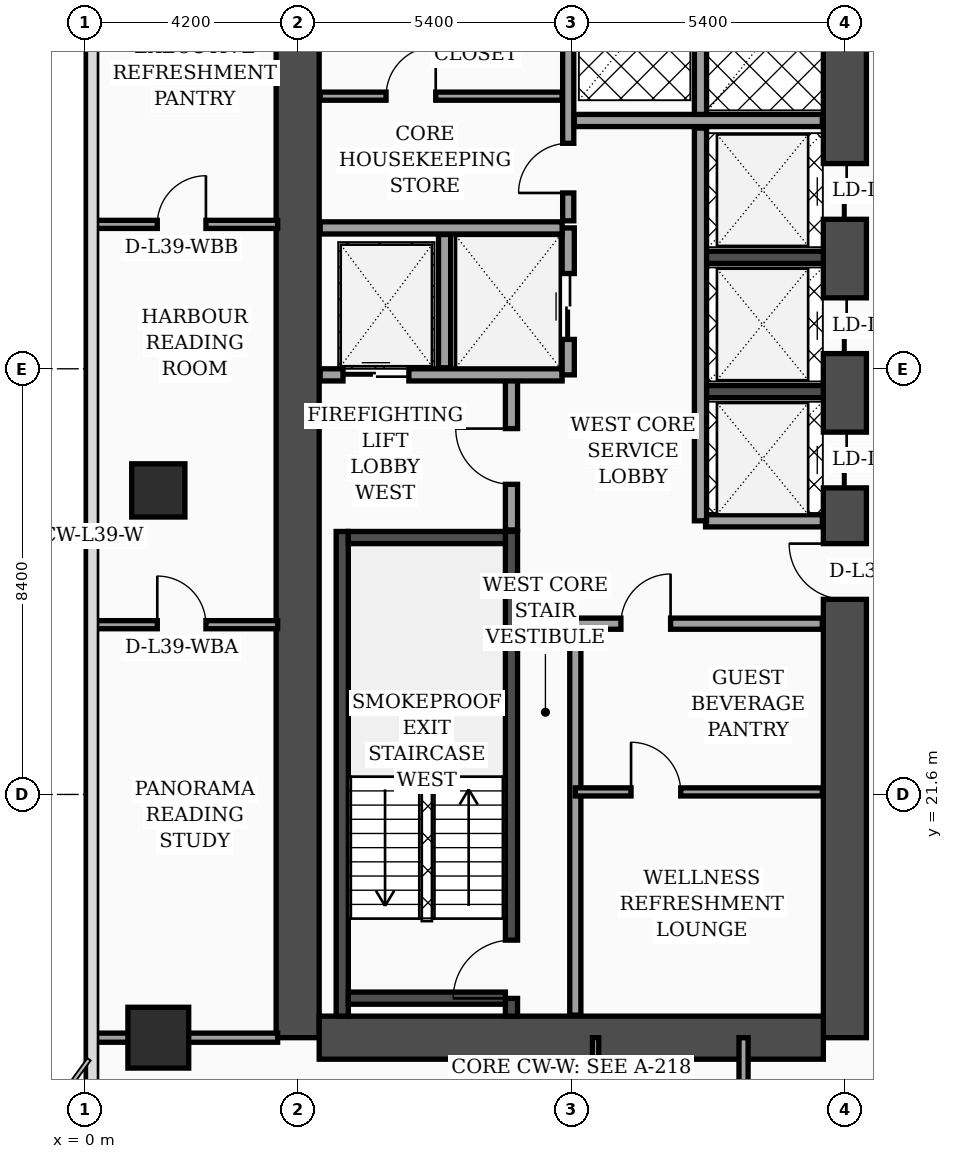
"""IFC4 building model, lengths in metres.
Left out: names, types, materials, properties, quantities, classifications, styles, units other than length and angle.
Written with IfcOpenShell. Run it as: python <this file> out.ifc"""

import sys

from ifc_helpers import new_model, si_unit, direction, frame, frame_2d, origin, origin_2d, place, context, subcontext, project, spatial, rectangle, extrude, element, fill, save


model = new_model("IFC4")
c1 = context("Model", 3, precision=1e-05, world=origin(), true_north=direction((0.0, 1.0)))
c2 = subcontext(c1, "Body", "Model", "MODEL_VIEW")
j1 = project(units=[si_unit("LENGTHUNIT", "METRE"), si_unit("PLANEANGLEUNIT", "RADIAN")], contexts=[c1])
p1 = place(None, origin())
s1 = spatial("IfcSite", under=j1, at=p1, CompositionType="ELEMENT")
p2 = place(p1, origin())
s2 = spatial("IfcBuilding", under=s1, at=p2, CompositionType="ELEMENT")
p3 = place(p2, frame((0.0, 0.0, 159.9)))
s3 = spatial("IfcBuildingStorey", under=s2, at=p3, CompositionType="ELEMENT", Elevation=159.9)
p4 = place(p3, frame((4.2, 16.8, 0.0), z_axis=(0.0, 0.0, 1.0), x_axis=(0.0, 1.0, 0.0)))
e1 = element("IfcWall", 1, at=p4, inside=s3, PredefinedType="SHEAR", context=c2, shape_type="SweptSolid", body=[
    extrude(rectangle(XDim=21.6, YDim=0.85, at=frame_2d((10.8, 0.0))), origin(), (0.0, 0.0, 1.0), 3.56),
])
p5 = place(p3, frame((15.0, 16.8, 0.0), z_axis=(0.0, 0.0, 1.0), x_axis=(0.0, 1.0, 0.0)))
e2 = element("IfcWall", 2, at=p5, inside=s3, PredefinedType="SHEAR", context=c2, shape_type="SweptSolid", body=[
    extrude(rectangle(XDim=21.6, YDim=0.85, at=frame_2d((10.8, 0.0))), origin(), (0.0, 0.0, 1.0), 3.56),
])
p6 = place(p5, frame((8.65, 0.0, 0.0)))
e3 = element("IfcOpeningElement", 3, at=p6, cuts=e2, PredefinedType="OPENING", context=c2, shape_type="SweptSolid", body=[
    extrude(rectangle(XDim=1.1, YDim=2.2, at=frame_2d((0.55, 1.1))), frame((0.0, 0.435, 0.0), z_axis=(0.0, -1.0, 0.0), x_axis=(1.0, 0.0, 0.0)), (0.0, 0.0, 1.0), 0.87),
])
p7 = place(p5, frame((10.85, 0.0, 0.0)))
e4 = element("IfcOpeningElement", 4, at=p7, cuts=e2, PredefinedType="OPENING", context=c2, shape_type="SweptSolid", body=[
    extrude(rectangle(XDim=1.1, YDim=2.2, at=frame_2d((0.55, 1.1))), frame((0.0, 0.435, 0.0), z_axis=(0.0, -1.0, 0.0), x_axis=(1.0, 0.0, 0.0)), (0.0, 0.0, 1.0), 0.87),
])
p8 = place(p5, frame((13.5, 0.0, 0.0)))
e5 = element("IfcOpeningElement", 5, at=p8, cuts=e2, PredefinedType="OPENING", context=c2, shape_type="SweptSolid", body=[
    extrude(rectangle(XDim=1.1, YDim=2.2, at=frame_2d((0.55, 1.1))), frame((0.0, 0.435, 0.0), z_axis=(0.0, -1.0, 0.0), x_axis=(1.0, 0.0, 0.0)), (0.0, 0.0, 1.0), 0.87),
])
p9 = place(p5, frame((16.15, 0.0, 0.0)))
e6 = element("IfcOpeningElement", 6, at=p9, cuts=e2, PredefinedType="OPENING", context=c2, shape_type="SweptSolid", body=[
    extrude(rectangle(XDim=1.1, YDim=2.2, at=frame_2d((0.55, 1.1))), frame((0.0, 0.435, 0.0), z_axis=(0.0, -1.0, 0.0), x_axis=(1.0, 0.0, 0.0)), (0.0, 0.0, 1.0), 0.87),
])
p10 = place(p3, frame((4.625, 16.8, 0.0), z_axis=(0.0, 0.0, 1.0), x_axis=(1.0, 0.0, 0.0)))
e7 = element("IfcWall", 7, at=p10, inside=s3, PredefinedType="SHEAR", context=c2, shape_type="SweptSolid", body=[
    extrude(rectangle(XDim=9.95, YDim=0.85, at=frame_2d((4.975, 0.0))), origin(), (0.0, 0.0, 1.0), 3.56),
])
p11 = place(p3, frame((5.08, 17.225, 0.0), z_axis=(0.0, 0.0, 1.0), x_axis=(0.0, 1.0, 0.0)))
e8 = element("IfcWall", 8, at=p11, inside=s3, PredefinedType="SOLIDWALL", context=c2, shape_type="SweptSolid", body=[
    extrude(rectangle(XDim=9.565, YDim=0.24, at=frame_2d((4.782, 0.0))), origin(), (0.0, 0.0, 1.0), 3.56),
])
p12 = place(p3, frame((8.42, 17.225, 0.0), z_axis=(0.0, 0.0, 1.0), x_axis=(0.0, 1.0, 0.0)))
e9 = element("IfcWall", 9, at=p12, inside=s3, PredefinedType="SOLIDWALL", context=c2, shape_type="SweptSolid", body=[
    extrude(rectangle(XDim=9.565, YDim=0.24, at=frame_2d((4.782, 0.0))), origin(), (0.0, 0.0, 1.0), 3.56),
])
p13 = place(p12, frame((0.35, 0.0, 0.0)))
e10 = element("IfcOpeningElement", 10, at=p13, cuts=e9, PredefinedType="OPENING", context=c2, shape_type="SweptSolid", body=[
    extrude(rectangle(XDim=1.15, YDim=2.2, at=frame_2d((0.575, 1.1))), frame((0.0, 0.13, 0.0), z_axis=(0.0, -1.0, 0.0), x_axis=(1.0, 0.0, 0.0)), (0.0, 0.0, 1.0), 0.26),
])
for number, where, z_axis, x_axis in (
    (11, (5.2, 17.58, 0.0), (0.0, 0.0, 1.0), (1.0, 0.0, 0.0)),
    (12, (5.2, 26.67, 0.0), (0.0, 0.0, 1.0), (1.0, 0.0, 0.0)),
):
    element("IfcWall", number, at=place(p3, frame(where, z_axis=z_axis, x_axis=x_axis)), inside=s3, PredefinedType="SOLIDWALL", context=c2, shape_type="SweptSolid", body=[
        extrude(rectangle(XDim=3.1, YDim=0.24, at=frame_2d((1.55, 0.0))), origin(), (0.0, 0.0, 1.0), 3.56),
    ])
for number, where, z_axis, x_axis in (
    (13, (12.18, 29.55, 0.0), (0.0, 0.0, 1.0), (1.0, 0.0, 0.0)),
    (14, (12.18, 32.2, 0.0), (0.0, 0.0, 1.0), (1.0, 0.0, 0.0)),
):
    element("IfcWall", number, at=place(p3, frame(where, z_axis=z_axis, x_axis=x_axis)), inside=s3, PredefinedType="SOLIDWALL", context=c2, shape_type="SweptSolid", body=[
        extrude(rectangle(XDim=2.395, YDim=0.24, at=frame_2d((1.198, 0.0))), origin(), (0.0, 0.0, 1.0), 3.56),
    ])
p14 = place(p3, frame((1.45, 16.8, 0.0), z_axis=(0.0, 0.0, 1.0), x_axis=(1.0, 0.0, 0.0)))
e15 = element("IfcColumn", 15, at=p14, inside=s3, PredefinedType="COLUMN", context=c2, shape_type="SweptSolid", body=[
    extrude(rectangle(XDim=1.2, YDim=1.2, at=origin_2d()), origin(), (0.0, 0.0, 1.0), 3.56),
])
p15 = place(p3, frame((1.45, 27.6, 0.0), z_axis=(0.0, 0.0, 1.0), x_axis=(1.0, 0.0, 0.0)))
e16 = element("IfcColumn", 16, at=p15, inside=s3, PredefinedType="COLUMN", context=c2, shape_type="SweptSolid", body=[
    extrude(rectangle(XDim=1.05, YDim=1.05, at=origin_2d()), origin(), (0.0, 0.0, 1.0), 3.56),
])
p16 = place(p3, frame((8.42, 26.82, 0.0), z_axis=(0.0, 0.0, 1.0), x_axis=(0.0, 1.0, 0.0)))
e17 = element("IfcWall", 17, at=p16, inside=s3, PredefinedType="SOLIDWALL", context=c2, shape_type="SweptSolid", body=[
    extrude(rectangle(XDim=3.0, YDim=0.24, at=frame_2d((1.5, 0.0))), origin(), (0.0, 0.0, 1.0), 3.56),
])
p17 = place(p16, frame((0.9, 0.0, 0.0)))
e18 = element("IfcOpeningElement", 18, at=p17, cuts=e17, PredefinedType="OPENING", context=c2, shape_type="SweptSolid", body=[
    extrude(rectangle(XDim=1.1, YDim=2.2, at=frame_2d((0.55, 1.1))), frame((0.0, 0.13, 0.0), z_axis=(0.0, -1.0, 0.0), x_axis=(1.0, 0.0, 0.0)), (0.0, 0.0, 1.0), 0.26),
])
p18 = place(p3, frame((4.645, 29.88, 0.0), z_axis=(0.0, 0.0, 1.0), x_axis=(1.0, 0.0, 0.0)))
e19 = element("IfcWall", 19, at=p18, inside=s3, PredefinedType="SOLIDWALL", context=c2, shape_type="SweptSolid", body=[
    extrude(rectangle(XDim=4.775, YDim=0.24, at=frame_2d((2.387, 0.0))), origin(), (0.0, 0.0, 1.0), 3.56),
])
p19 = place(p18, frame((0.45, 0.0, 0.0)))
e20 = element("IfcOpeningElement", 20, at=p19, cuts=e19, PredefinedType="OPENING", context=c2, shape_type="SweptSolid", body=[
    extrude(rectangle(XDim=1.3, YDim=2.35, at=frame_2d((0.65, 1.175))), frame((0.0, 0.13, 0.0), z_axis=(0.0, -1.0, 0.0), x_axis=(1.0, 0.0, 0.0)), (0.0, 0.0, 1.0), 0.26),
])
p20 = place(p3, frame((7.1, 30.02, 0.0), z_axis=(0.0, 0.0, 1.0), x_axis=(0.0, 1.0, 0.0)))
e21 = element("IfcWall", 21, at=p20, inside=s3, PredefinedType="SOLIDWALL", context=c2, shape_type="SweptSolid", body=[
    extrude(rectangle(XDim=2.63, YDim=0.24, at=frame_2d((1.315, 0.0))), origin(), (0.0, 0.0, 1.0), 3.56),
])
p21 = place(p3, frame((9.54, 29.88, 0.0), z_axis=(0.0, 0.0, 1.0), x_axis=(0.0, 1.0, 0.0)))
e22 = element("IfcWall", 22, at=p21, inside=s3, PredefinedType="SOLIDWALL", context=c2, shape_type="SweptSolid", body=[
    extrude(rectangle(XDim=2.9, YDim=0.24, at=frame_2d((1.45, 0.0))), origin(), (0.0, 0.0, 1.0), 3.56),
])
p22 = place(p21, frame((0.7, 0.0, 0.0)))
e23 = element("IfcOpeningElement", 23, at=p22, cuts=e22, PredefinedType="OPENING", context=c2, shape_type="SweptSolid", body=[
    extrude(rectangle(XDim=1.3, YDim=2.35, at=frame_2d((0.65, 1.175))), frame((0.0, 0.13, 0.0), z_axis=(0.0, -1.0, 0.0), x_axis=(1.0, 0.0, 0.0)), (0.0, 0.0, 1.0), 0.26),
])
p23 = place(p3, frame((4.645, 32.78, 0.0), z_axis=(0.0, 0.0, 1.0), x_axis=(1.0, 0.0, 0.0)))
e24 = element("IfcWall", 24, at=p23, inside=s3, PredefinedType="SOLIDWALL", context=c2, shape_type="SweptSolid", body=[
    extrude(rectangle(XDim=4.775, YDim=0.24, at=frame_2d((2.387, 0.0))), origin(), (0.0, 0.0, 1.0), 3.19),
])
p24 = place(p3, frame((9.68, 17.245, 0.0), z_axis=(0.0, 0.0, 1.0), x_axis=(0.0, 1.0, 0.0)))
e25 = element("IfcWall", 25, at=p24, inside=s3, PredefinedType="SOLIDWALL", context=c2, shape_type="SweptSolid", body=[
    extrude(rectangle(XDim=7.755, YDim=0.22, at=frame_2d((3.877, 0.0))), origin(), (0.0, 0.0, 1.0), 3.56),
])
p25 = place(p3, frame((4.645, 35.38, 0.0), z_axis=(0.0, 0.0, 1.0), x_axis=(1.0, 0.0, 0.0)))
e26 = element("IfcWall", 26, at=p25, inside=s3, PredefinedType="PARTITIONING", context=c2, shape_type="SweptSolid", body=[
    extrude(rectangle(XDim=4.775, YDim=0.16, at=frame_2d((2.387, 0.0))), origin(), (0.0, 0.0, 1.0), 3.56),
])
p26 = place(p25, frame((1.3, 0.0, 0.0)))
e27 = element("IfcOpeningElement", 27, at=p26, cuts=e26, PredefinedType="OPENING", context=c2, shape_type="SweptSolid", body=[
    extrude(rectangle(XDim=0.98, YDim=2.15, at=frame_2d((0.49, 1.075))), frame((0.0, 0.09, 0.0), z_axis=(0.0, -1.0, 0.0), x_axis=(1.0, 0.0, 0.0)), (0.0, 0.0, 1.0), 0.18),
])
p27 = place(p3, frame((9.54, 32.92, 0.0), z_axis=(0.0, 0.0, 1.0), x_axis=(0.0, 1.0, 0.0)))
e28 = element("IfcWall", 28, at=p27, inside=s3, PredefinedType="SOLIDWALL", context=c2, shape_type="SweptSolid", body=[
    extrude(rectangle(XDim=5.035, YDim=0.22, at=frame_2d((2.518, 0.0))), origin(), (0.0, 0.0, 1.0), 3.56),
])
p28 = place(p27, frame((0.55, 0.0, 0.0)))
e29 = element("IfcOpeningElement", 29, at=p28, cuts=e28, PredefinedType="OPENING", context=c2, shape_type="SweptSolid", body=[
    extrude(rectangle(XDim=0.98, YDim=2.15, at=frame_2d((0.49, 1.075))), frame((0.0, 0.12, 0.0), z_axis=(0.0, -1.0, 0.0), x_axis=(1.0, 0.0, 0.0)), (0.0, 0.0, 1.0), 0.24),
])
p29 = place(p3, frame((9.68, 21.65, 0.0), z_axis=(0.0, 0.0, 1.0), x_axis=(1.0, 0.0, 0.0)))
e30 = element("IfcWall", 30, at=p29, inside=s3, PredefinedType="PARTITIONING", context=c2, shape_type="SweptSolid", body=[
    extrude(rectangle(XDim=4.875, YDim=0.16, at=frame_2d((2.438, 0.0))), origin(), (0.0, 0.0, 1.0), 3.09),
])
p30 = place(p29, frame((1.1, 0.0, 0.0)))
e31 = element("IfcOpeningElement", 31, at=p30, cuts=e30, PredefinedType="OPENING", context=c2, shape_type="SweptSolid", body=[
    extrude(rectangle(XDim=0.98, YDim=2.15, at=frame_2d((0.49, 1.075))), frame((0.0, 0.09, 0.0), z_axis=(0.0, -1.0, 0.0), x_axis=(1.0, 0.0, 0.0)), (0.0, 0.0, 1.0), 0.18),
])
p31 = place(p3, frame((9.68, 24.97, 0.0), z_axis=(0.0, 0.0, 1.0), x_axis=(1.0, 0.0, 0.0)))
e32 = element("IfcWall", 32, at=p31, inside=s3, PredefinedType="SOLIDWALL", context=c2, shape_type="SweptSolid", body=[
    extrude(rectangle(XDim=4.875, YDim=0.22, at=frame_2d((2.438, 0.0))), origin(), (0.0, 0.0, 1.0), 2.94),
])
p32 = place(p31, frame((0.9, 0.0, 0.0)))
e33 = element("IfcOpeningElement", 33, at=p32, cuts=e32, PredefinedType="OPENING", context=c2, shape_type="SweptSolid", body=[
    extrude(rectangle(XDim=0.98, YDim=2.15, at=frame_2d((0.49, 1.075))), frame((0.0, 0.12, 0.0), z_axis=(0.0, -1.0, 0.0), x_axis=(1.0, 0.0, 0.0)), (0.0, 0.0, 1.0), 0.24),
])
p33 = place(p3, frame((12.25, 27.0, 0.0), z_axis=(0.0, 0.0, 1.0), x_axis=(1.0, 0.0, 0.0)))
e34 = element("IfcWall", 34, at=p33, inside=s3, PredefinedType="SOLIDWALL", context=c2, shape_type="SweptSolid", body=[
    extrude(rectangle(XDim=2.305, YDim=0.24, at=frame_2d((1.152, 0.0))), origin(), (0.0, 0.0, 1.0), 3.56),
])
p34 = place(p3, frame((12.15, 27.0, 0.0), z_axis=(0.0, 0.0, 1.0), x_axis=(0.0, 1.0, 0.0)))
e35 = element("IfcWall", 35, at=p34, inside=s3, PredefinedType="SOLIDWALL", context=c2, shape_type="SweptSolid", body=[
    extrude(rectangle(XDim=7.75, YDim=0.24, at=frame_2d((3.875, 0.0))), origin(), (0.0, 0.0, 1.0), 3.56),
])
p35 = place(p3, frame((9.66, 34.9, 0.0), z_axis=(0.0, 0.0, 1.0), x_axis=(1.0, 0.0, 0.0)))
e36 = element("IfcWall", 36, at=p35, inside=s3, PredefinedType="SOLIDWALL", context=c2, shape_type="SweptSolid", body=[
    extrude(rectangle(XDim=4.895, YDim=0.24, at=frame_2d((2.448, 0.0))), origin(), (0.0, 0.0, 1.0), 3.56),
])
p36 = place(p3, frame((12.15, 35.02, 0.0), z_axis=(0.0, 0.0, 1.0), x_axis=(0.0, 1.0, 0.0)))
e37 = element("IfcWall", 37, at=p36, inside=s3, PredefinedType="SOLIDWALL", context=c2, shape_type="SweptSolid", body=[
    extrude(rectangle(XDim=2.935, YDim=0.24, at=frame_2d((1.468, 0.0))), origin(), (0.0, 0.0, 1.0), 3.56),
])
p37 = place(p3, frame((0.08, 24.95, 0.0), z_axis=(0.0, 0.0, 1.0), x_axis=(1.0, 0.0, 0.0)))
e38 = element("IfcWall", 38, at=p37, inside=s3, PredefinedType="PARTITIONING", context=c2, shape_type="SweptSolid", body=[
    extrude(rectangle(XDim=3.725, YDim=0.16, at=frame_2d((1.862, 0.0))), origin(), (0.0, 0.0, 1.0), 3.04),
])
p38 = place(p37, frame((1.35, 0.0, 0.0)))
e39 = element("IfcOpeningElement", 39, at=p38, cuts=e38, PredefinedType="OPENING", context=c2, shape_type="SweptSolid", body=[
    extrude(rectangle(XDim=0.96, YDim=2.2, at=frame_2d((0.48, 1.1))), frame((0.0, 0.09, 0.0), z_axis=(0.0, -1.0, 0.0), x_axis=(1.0, 0.0, 0.0)), (0.0, 0.0, 1.0), 0.18),
])
p39 = place(p3, frame((0.08, 32.85, 0.0), z_axis=(0.0, 0.0, 1.0), x_axis=(1.0, 0.0, 0.0)))
e40 = element("IfcWall", 40, at=p39, inside=s3, PredefinedType="PARTITIONING", context=c2, shape_type="SweptSolid", body=[
    extrude(rectangle(XDim=3.725, YDim=0.16, at=frame_2d((1.862, 0.0))), origin(), (0.0, 0.0, 1.0), 3.04),
])
p40 = place(p39, frame((1.35, 0.0, 0.0)))
e41 = element("IfcOpeningElement", 41, at=p40, cuts=e40, PredefinedType="OPENING", context=c2, shape_type="SweptSolid", body=[
    extrude(rectangle(XDim=0.96, YDim=2.2, at=frame_2d((0.48, 1.1))), frame((0.0, 0.09, 0.0), z_axis=(0.0, -1.0, 0.0), x_axis=(1.0, 0.0, 0.0)), (0.0, 0.0, 1.0), 0.18),
])
p41 = place(p3, frame((0.08, 16.8, 0.0), z_axis=(0.0, 0.0, 1.0), x_axis=(1.0, 0.0, 0.0)))
e42 = element("IfcWall", 42, at=p41, inside=s3, PredefinedType="PARTITIONING", context=c2, shape_type="SweptSolid", body=[
    extrude(rectangle(XDim=3.725, YDim=0.18, at=frame_2d((1.862, 0.0))), origin(), (0.0, 0.0, 1.0), 2.94),
])
p42 = place(p3, frame((10.08, 14.75, 0.0), z_axis=(0.0, 0.0, 1.0), x_axis=(0.0, 1.0, 0.0)))
e43 = element("IfcWall", 43, at=p42, inside=s3, PredefinedType="PARTITIONING", context=c2, shape_type="SweptSolid", body=[
    extrude(rectangle(XDim=2.05, YDim=0.125, at=frame_2d((1.025, 0.0))), origin(), (0.0, 0.0, 1.0), 3.56),
])
p43 = place(p3, frame((13.0, 2.44, 0.0), z_axis=(0.0, 0.0, 1.0), x_axis=(0.0, 1.0, 0.0)))
e44 = element("IfcWall", 44, at=p43, inside=s3, PredefinedType="PARTITIONING", context=c2, shape_type="SweptSolid", body=[
    extrude(rectangle(XDim=14.36, YDim=0.18, at=frame_2d((7.18, 0.0))), origin(), (0.0, 0.0, 1.0), 2.94),
])
p44 = place(p43, frame((3.01, 0.0, 0.0)))
e45 = element("IfcOpeningElement", 45, at=p44, cuts=e44, PredefinedType="OPENING", context=c2, shape_type="SweptSolid", body=[
    extrude(rectangle(XDim=1.02, YDim=2.2, at=frame_2d((0.51, 1.1))), frame((0.0, 0.1, 0.0), z_axis=(0.0, -1.0, 0.0), x_axis=(1.0, 0.0, 0.0)), (0.0, 0.0, 1.0), 0.2),
])
p45 = place(p43, frame((9.18, 0.0, 0.0)))
e46 = element("IfcOpeningElement", 46, at=p45, cuts=e44, PredefinedType="OPENING", context=c2, shape_type="SweptSolid", body=[
    extrude(rectangle(XDim=1.02, YDim=2.2, at=frame_2d((0.51, 1.1))), frame((0.0, 0.1, 0.0), z_axis=(0.0, -1.0, 0.0), x_axis=(1.0, 0.0, 0.0)), (0.0, 0.0, 1.0), 0.2),
])
p46 = place(p17, origin())
e47 = element("IfcDoor", 47, at=p46, inside=s3, OperationType="SINGLE_SWING_RIGHT", PredefinedType="DOOR", context=c2, shape_type="SweptSolid", body=[
    extrude(rectangle(XDim=1.1, YDim=2.2, at=frame_2d((0.55, 1.1))), frame((0.0, 0.025, 0.0), z_axis=(0.0, -1.0, 0.0), x_axis=(1.0, 0.0, 0.0)), (0.0, 0.0, 1.0), 0.05),
])
fill(e18, e47)
p47 = place(p19, origin())
e48 = element("IfcDoor", 48, at=p47, inside=s3, OperationType="DOUBLE_DOOR_SLIDING", PredefinedType="DOOR", context=c2, shape_type="SweptSolid", body=[
    extrude(rectangle(XDim=1.3, YDim=2.35, at=frame_2d((0.65, 1.175))), frame((0.0, 0.025, 0.0), z_axis=(0.0, -1.0, 0.0), x_axis=(1.0, 0.0, 0.0)), (0.0, 0.0, 1.0), 0.05),
])
fill(e20, e48)
p48 = place(p22, origin())
e49 = element("IfcDoor", 49, at=p48, inside=s3, OperationType="DOUBLE_DOOR_SLIDING", PredefinedType="DOOR", context=c2, shape_type="SweptSolid", body=[
    extrude(rectangle(XDim=1.3, YDim=2.35, at=frame_2d((0.65, 1.175))), frame((0.0, 0.025, 0.0), z_axis=(0.0, -1.0, 0.0), x_axis=(1.0, 0.0, 0.0)), (0.0, 0.0, 1.0), 0.05),
])
fill(e23, e49)
p49 = place(p26, origin())
e50 = element("IfcDoor", 50, at=p49, inside=s3, OperationType="SINGLE_SWING_RIGHT", PredefinedType="DOOR", context=c2, shape_type="SweptSolid", body=[
    extrude(rectangle(XDim=0.98, YDim=2.15, at=frame_2d((0.49, 1.075))), frame((0.0, 0.025, 0.0), z_axis=(0.0, -1.0, 0.0), x_axis=(1.0, 0.0, 0.0)), (0.0, 0.0, 1.0), 0.05),
])
fill(e27, e50)
p50 = place(p28, origin())
e51 = element("IfcDoor", 51, at=p50, inside=s3, OperationType="SINGLE_SWING_LEFT", PredefinedType="DOOR", context=c2, shape_type="SweptSolid", body=[
    extrude(rectangle(XDim=0.98, YDim=2.15, at=frame_2d((0.49, 1.075))), frame((0.0, 0.025, 0.0), z_axis=(0.0, -1.0, 0.0), x_axis=(1.0, 0.0, 0.0)), (0.0, 0.0, 1.0), 0.05),
])
fill(e29, e51)
p51 = place(p30, origin())
e52 = element("IfcDoor", 52, at=p51, inside=s3, OperationType="SINGLE_SWING_LEFT", PredefinedType="DOOR", context=c2, shape_type="SweptSolid", body=[
    extrude(rectangle(XDim=0.98, YDim=2.15, at=frame_2d((0.49, 1.075))), frame((0.0, 0.025, 0.0), z_axis=(0.0, -1.0, 0.0), x_axis=(1.0, 0.0, 0.0)), (0.0, 0.0, 1.0), 0.05),
])
fill(e31, e52)
p52 = place(p32, origin())
e53 = element("IfcDoor", 53, at=p52, inside=s3, OperationType="SINGLE_SWING_RIGHT", PredefinedType="DOOR", context=c2, shape_type="SweptSolid", body=[
    extrude(rectangle(XDim=0.98, YDim=2.15, at=frame_2d((0.49, 1.075))), frame((0.0, 0.025, 0.0), z_axis=(0.0, -1.0, 0.0), x_axis=(1.0, 0.0, 0.0)), (0.0, 0.0, 1.0), 0.05),
])
fill(e33, e53)
p53 = place(p38, origin())
e54 = element("IfcDoor", 54, at=p53, inside=s3, OperationType="SINGLE_SWING_LEFT", PredefinedType="DOOR", context=c2, shape_type="SweptSolid", body=[
    extrude(rectangle(XDim=0.96, YDim=2.2, at=frame_2d((0.48, 1.1))), frame((0.0, 0.025, 0.0), z_axis=(0.0, -1.0, 0.0), x_axis=(1.0, 0.0, 0.0)), (0.0, 0.0, 1.0), 0.05),
])
fill(e39, e54)
p54 = place(p40, origin())
e55 = element("IfcDoor", 55, at=p54, inside=s3, OperationType="SINGLE_SWING_RIGHT", PredefinedType="DOOR", context=c2, shape_type="SweptSolid", body=[
    extrude(rectangle(XDim=0.96, YDim=2.2, at=frame_2d((0.48, 1.1))), frame((0.0, 0.025, 0.0), z_axis=(0.0, -1.0, 0.0), x_axis=(1.0, 0.0, 0.0)), (0.0, 0.0, 1.0), 0.05),
])
fill(e41, e55)
p55 = place(p13, origin())
e56 = element("IfcDoor", 56, at=p55, inside=s3, OperationType="SINGLE_SWING_LEFT", PredefinedType="DOOR", context=c2, shape_type="SweptSolid", body=[
    extrude(rectangle(XDim=1.15, YDim=2.2, at=frame_2d((0.575, 1.1))), frame((0.0, 0.025, 0.0), z_axis=(0.0, -1.0, 0.0), x_axis=(1.0, 0.0, 0.0)), (0.0, 0.0, 1.0), 0.05),
])
fill(e10, e56)
p56 = place(p6, origin())
e57 = element("IfcDoor", 57, at=p56, inside=s3, OperationType="SINGLE_SWING_RIGHT", PredefinedType="DOOR", context=c2, shape_type="SweptSolid", body=[
    extrude(rectangle(XDim=1.1, YDim=2.2, at=frame_2d((0.55, 1.1))), frame((0.0, 0.025, 0.0), z_axis=(0.0, -1.0, 0.0), x_axis=(1.0, 0.0, 0.0)), (0.0, 0.0, 1.0), 0.05),
])
fill(e3, e57)
p57 = place(p7, origin())
e58 = element("IfcDoor", 58, at=p57, inside=s3, OperationType="DOUBLE_DOOR_SLIDING", PredefinedType="DOOR", context=c2, shape_type="SweptSolid", body=[
    extrude(rectangle(XDim=1.1, YDim=2.2, at=frame_2d((0.55, 1.1))), frame((0.0, 0.025, 0.0), z_axis=(0.0, -1.0, 0.0), x_axis=(1.0, 0.0, 0.0)), (0.0, 0.0, 1.0), 0.05),
])
fill(e4, e58)
p58 = place(p8, origin())
e59 = element("IfcDoor", 59, at=p58, inside=s3, OperationType="DOUBLE_DOOR_SLIDING", PredefinedType="DOOR", context=c2, shape_type="SweptSolid", body=[
    extrude(rectangle(XDim=1.1, YDim=2.2, at=frame_2d((0.55, 1.1))), frame((0.0, 0.025, 0.0), z_axis=(0.0, -1.0, 0.0), x_axis=(1.0, 0.0, 0.0)), (0.0, 0.0, 1.0), 0.05),
])
fill(e5, e59)
p59 = place(p9, origin())
e60 = element("IfcDoor", 60, at=p59, inside=s3, OperationType="DOUBLE_DOOR_SLIDING", PredefinedType="DOOR", context=c2, shape_type="SweptSolid", body=[
    extrude(rectangle(XDim=1.1, YDim=2.2, at=frame_2d((0.55, 1.1))), frame((0.0, 0.025, 0.0), z_axis=(0.0, -1.0, 0.0), x_axis=(1.0, 0.0, 0.0)), (0.0, 0.0, 1.0), 0.05),
])
fill(e6, e60)
save(model, sys.argv[1])
